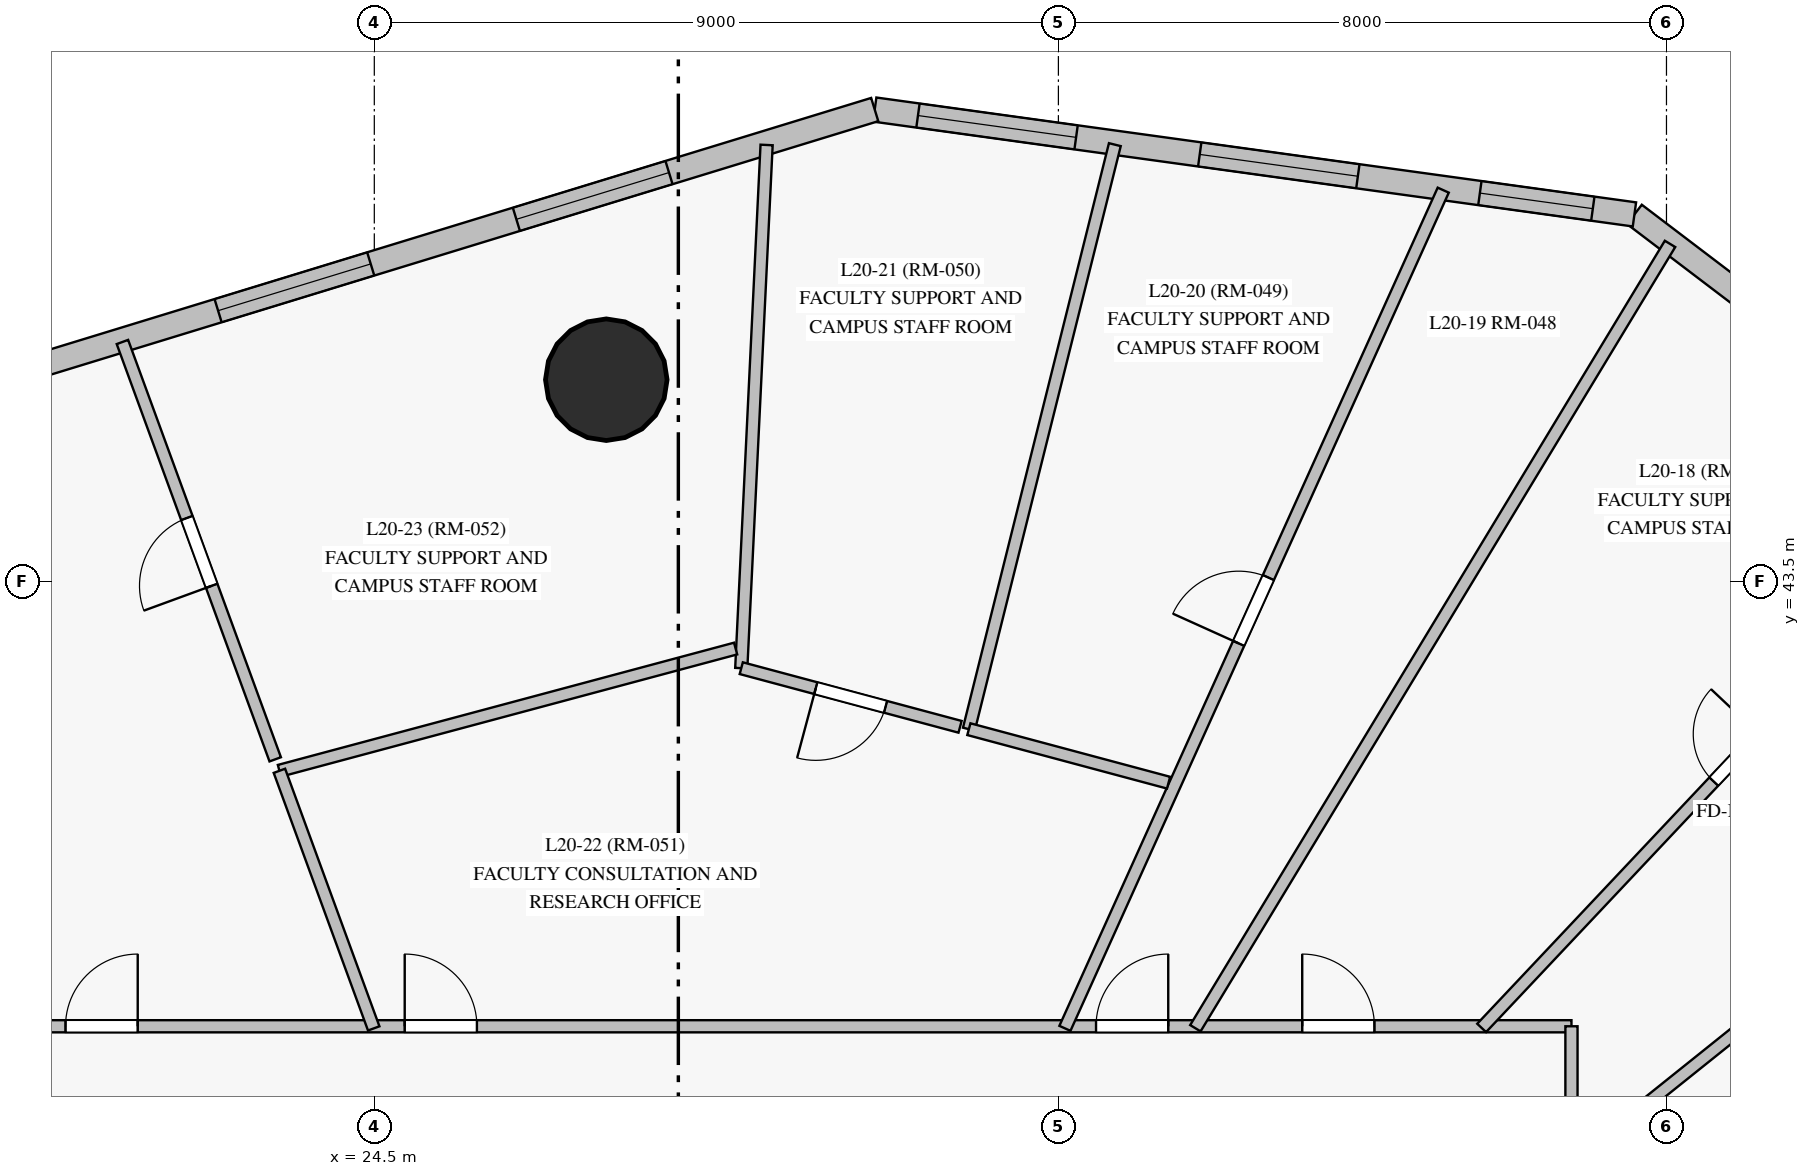
"""IFC4 building model, lengths in metres.
Left out: names, types, materials, properties, quantities, classifications, styles, units other than length and angle.
Written with IfcOpenShell. Run it as: python <this file> out.ifc"""

import sys

from ifc_helpers import new_model, si_unit, direction, frame, frame_2d, origin, origin_with_axes, origin_2d, place, context, subcontext, project, spatial, rectangle, circle, extrude, source, transform, mapped, element, fill, save


model = new_model("IFC4")
c1 = context("Model", 3, precision=1e-05, world=origin(), true_north=direction((0.0, 1.0)))
c2 = subcontext(c1, "Body", "Model", "MODEL_VIEW")
j1 = project(units=[si_unit("LENGTHUNIT", "METRE"), si_unit("PLANEANGLEUNIT", "RADIAN")], contexts=[c1])
p1 = place(None, origin())
s1 = spatial("IfcSite", under=j1, at=p1, CompositionType="ELEMENT")
p2 = place(p1, origin())
s2 = spatial("IfcBuilding", under=s1, at=p2, CompositionType="ELEMENT")
p3 = place(p2, frame((0.0, 0.0, 76.9)))
s3 = spatial("IfcBuildingStorey", under=s2, at=p3, CompositionType="ELEMENT", Elevation=76.9)
m1 = source(origin_with_axes(), c2, "Body", "SweptSolid", [
    extrude(circle(Radius=0.8, at=origin_2d()), origin(), (0.0, 0.0, 1.0), 3.6),
])
p4 = place(p3, frame((27.552, 46.156, 0.0), z_axis=(0.0, 0.0, 1.0), x_axis=(1.0, 0.0, 0.0)))
e1 = element("IfcColumn", 1, at=p4, inside=s3, PredefinedType="COLUMN", context=c2, shape_type="MappedRepresentation", body=[
    mapped(m1, transform((0.0, 0.0, 0.0), scale=1.0)),
])
p5 = place(p3, frame((51.069, 40.737, 0.0), z_axis=(0.0, 0.0, 1.0), x_axis=(-0.796119452113, 0.605139502898, 0.0)))
e2 = element("IfcWall", 2, at=p5, inside=s3, PredefinedType="SOLIDWALL", context=c2, shape_type="SweptSolid", body=[
    extrude(rectangle(XDim=12.548, YDim=0.32, at=frame_2d((6.274, 0.0))), origin(), (0.0, 0.0, 1.0), 3.35),
])
p6 = place(p5, frame((0.503, 0.0, 0.85)))
e3 = element("IfcOpeningElement", 3, at=p6, cuts=e2, PredefinedType="OPENING", context=c2, shape_type="SweptSolid", body=[
    extrude(rectangle(XDim=2.1, YDim=1.95, at=frame_2d((1.05, 0.975))), frame((0.0, 0.17, 0.0), z_axis=(0.0, -1.0, 0.0), x_axis=(1.0, 0.0, 0.0)), (0.0, 0.0, 1.0), 0.34),
])
p7 = place(p5, frame((3.796, 0.0, 0.85)))
e4 = element("IfcOpeningElement", 4, at=p7, cuts=e2, PredefinedType="OPENING", context=c2, shape_type="SweptSolid", body=[
    extrude(rectangle(XDim=2.1, YDim=1.95, at=frame_2d((1.05, 0.975))), frame((0.0, 0.17, 0.0), z_axis=(0.0, -1.0, 0.0), x_axis=(1.0, 0.0, 0.0)), (0.0, 0.0, 1.0), 0.34),
])
p8 = place(p5, frame((8.241, 0.0, 0.85)))
e5 = element("IfcOpeningElement", 5, at=p8, cuts=e2, PredefinedType="OPENING", context=c2, shape_type="SweptSolid", body=[
    extrude(rectangle(XDim=2.1, YDim=1.95, at=frame_2d((1.05, 0.975))), frame((0.0, 0.17, 0.0), z_axis=(0.0, -1.0, 0.0), x_axis=(1.0, 0.0, 0.0)), (0.0, 0.0, 1.0), 0.34),
])
p9 = place(p3, frame((41.079, 48.331, 0.0), z_axis=(0.0, 0.0, 1.0), x_axis=(-0.990610962214, 0.136711087848, 0.0)))
e6 = element("IfcWall", 6, at=p9, inside=s3, PredefinedType="SOLIDWALL", context=c2, shape_type="SweptSolid", body=[
    extrude(rectangle(XDim=10.09, YDim=0.32, at=frame_2d((5.045, 0.0))), origin(), (0.0, 0.0, 1.0), 3.35),
])
p10 = place(p9, frame((0.553, 0.0, 0.85)))
e7 = element("IfcOpeningElement", 7, at=p10, cuts=e6, PredefinedType="OPENING", context=c2, shape_type="SweptSolid", body=[
    extrude(rectangle(XDim=1.5, YDim=1.85, at=frame_2d((0.75, 0.925))), frame((0.0, 0.17, 0.0), z_axis=(0.0, -1.0, 0.0), x_axis=(1.0, 0.0, 0.0)), (0.0, 0.0, 1.0), 0.34),
])
p11 = place(p9, frame((3.673, 0.0, 0.85)))
e8 = element("IfcOpeningElement", 8, at=p11, cuts=e6, PredefinedType="OPENING", context=c2, shape_type="SweptSolid", body=[
    extrude(rectangle(XDim=2.1, YDim=1.95, at=frame_2d((1.05, 0.975))), frame((0.0, 0.17, 0.0), z_axis=(0.0, -1.0, 0.0), x_axis=(1.0, 0.0, 0.0)), (0.0, 0.0, 1.0), 0.34),
])
p12 = place(p9, frame((7.415, 0.0, 0.85)))
e9 = element("IfcOpeningElement", 9, at=p12, cuts=e6, PredefinedType="OPENING", context=c2, shape_type="SweptSolid", body=[
    extrude(rectangle(XDim=2.1, YDim=1.95, at=frame_2d((1.05, 0.975))), frame((0.0, 0.17, 0.0), z_axis=(0.0, -1.0, 0.0), x_axis=(1.0, 0.0, 0.0)), (0.0, 0.0, 1.0), 0.34),
])
p13 = place(p3, frame((31.083, 49.71, 0.0), z_axis=(0.0, 0.0, 1.0), x_axis=(-0.956152758826, -0.292868403536, 0.0)))
e10 = element("IfcWall", 10, at=p13, inside=s3, PredefinedType="SOLIDWALL", context=c2, shape_type="SweptSolid", body=[
    extrude(rectangle(XDim=14.63, YDim=0.32, at=frame_2d((7.315, 0.0))), origin(), (0.0, 0.0, 1.0), 3.35),
])
p14 = place(p13, frame((2.831, 0.0, 0.85)))
e11 = element("IfcOpeningElement", 11, at=p14, cuts=e10, PredefinedType="OPENING", context=c2, shape_type="SweptSolid", body=[
    extrude(rectangle(XDim=2.1, YDim=1.95, at=frame_2d((1.05, 0.975))), frame((0.0, 0.17, 0.0), z_axis=(0.0, -1.0, 0.0), x_axis=(1.0, 0.0, 0.0)), (0.0, 0.0, 1.0), 0.34),
])
p15 = place(p13, frame((6.935, 0.0, 0.85)))
e12 = element("IfcOpeningElement", 12, at=p15, cuts=e10, PredefinedType="OPENING", context=c2, shape_type="SweptSolid", body=[
    extrude(rectangle(XDim=2.1, YDim=1.95, at=frame_2d((1.05, 0.975))), frame((0.0, 0.17, 0.0), z_axis=(0.0, -1.0, 0.0), x_axis=(1.0, 0.0, 0.0)), (0.0, 0.0, 1.0), 0.34),
])
p16 = place(p13, frame((11.414, 0.0, 0.85)))
e13 = element("IfcOpeningElement", 13, at=p16, cuts=e10, PredefinedType="OPENING", context=c2, shape_type="SweptSolid", body=[
    extrude(rectangle(XDim=2.1, YDim=1.95, at=frame_2d((1.05, 0.975))), frame((0.0, 0.17, 0.0), z_axis=(0.0, -1.0, 0.0), x_axis=(1.0, 0.0, 0.0)), (0.0, 0.0, 1.0), 0.34),
])
p17 = place(p3, frame((10.5, 37.65, 0.0), z_axis=(0.0, 0.0, 1.0), x_axis=(1.0, 0.0, 0.0)))
e14 = element("IfcWall", 14, at=p17, inside=s3, PredefinedType="PARTITIONING", context=c2, shape_type="SweptSolid", body=[
    extrude(rectangle(XDim=29.75, YDim=0.16, at=frame_2d((14.875, 0.0))), origin(), (0.0, 0.0, 1.0), 2.75),
])
p18 = place(p17, frame((26.208, 0.0, 0.0)))
e15 = element("IfcOpeningElement", 15, at=p18, cuts=e14, PredefinedType="OPENING", context=c2, shape_type="SweptSolid", body=[
    extrude(rectangle(XDim=0.95, YDim=2.15, at=frame_2d((0.475, 1.075))), frame((0.0, 0.09, 0.0), z_axis=(0.0, -1.0, 0.0), x_axis=(1.0, 0.0, 0.0)), (0.0, 0.0, 1.0), 0.18),
])
p19 = place(p17, frame((23.495, 0.0, 0.0)))
e16 = element("IfcOpeningElement", 16, at=p19, cuts=e14, PredefinedType="OPENING", context=c2, shape_type="SweptSolid", body=[
    extrude(rectangle(XDim=0.95, YDim=2.15, at=frame_2d((0.475, 1.075))), frame((0.0, 0.09, 0.0), z_axis=(0.0, -1.0, 0.0), x_axis=(1.0, 0.0, 0.0)), (0.0, 0.0, 1.0), 0.18),
])
p20 = place(p17, frame((14.4, 0.0, 0.0)))
e17 = element("IfcOpeningElement", 17, at=p20, cuts=e14, PredefinedType="OPENING", context=c2, shape_type="SweptSolid", body=[
    extrude(rectangle(XDim=0.95, YDim=2.15, at=frame_2d((0.475, 1.075))), frame((0.0, 0.09, 0.0), z_axis=(0.0, -1.0, 0.0), x_axis=(1.0, 0.0, 0.0)), (0.0, 0.0, 1.0), 0.18),
])
p21 = place(p17, frame((9.938, 0.0, 0.0)))
e18 = element("IfcOpeningElement", 18, at=p21, cuts=e14, PredefinedType="OPENING", context=c2, shape_type="SweptSolid", body=[
    extrude(rectangle(XDim=0.95, YDim=2.15, at=frame_2d((0.475, 1.075))), frame((0.0, 0.09, 0.0), z_axis=(0.0, -1.0, 0.0), x_axis=(1.0, 0.0, 0.0)), (0.0, 0.0, 1.0), 0.18),
])
p22 = place(p17, frame((6.962, 0.0, 0.0)))
e19 = element("IfcOpeningElement", 19, at=p22, cuts=e14, PredefinedType="OPENING", context=c2, shape_type="SweptSolid", body=[
    extrude(rectangle(XDim=0.95, YDim=2.15, at=frame_2d((0.475, 1.075))), frame((0.0, 0.09, 0.0), z_axis=(0.0, -1.0, 0.0), x_axis=(1.0, 0.0, 0.0)), (0.0, 0.0, 1.0), 0.18),
])
p23 = place(p3, frame((40.25, 37.65, 0.0), z_axis=(0.0, 0.0, 1.0), x_axis=(0.0, -1.0, 0.0)))
e20 = element("IfcWall", 20, at=p23, inside=s3, PredefinedType="PARTITIONING", context=c2, shape_type="SweptSolid", body=[
    extrude(rectangle(XDim=22.3, YDim=0.16, at=frame_2d((11.15, 0.0))), origin(), (0.0, 0.0, 1.0), 2.75),
])
p24 = place(p23, frame((14.02, 0.0, 0.0)))
e21 = element("IfcOpeningElement", 21, at=p24, cuts=e20, PredefinedType="OPENING", context=c2, shape_type="SweptSolid", body=[
    extrude(rectangle(XDim=0.95, YDim=2.15, at=frame_2d((0.475, 1.075))), frame((0.0, 0.09, 0.0), z_axis=(0.0, -1.0, 0.0), x_axis=(1.0, 0.0, 0.0)), (0.0, 0.0, 1.0), 0.18),
])
p25 = place(p23, frame((10.675, 0.0, 0.0)))
e22 = element("IfcOpeningElement", 22, at=p25, cuts=e20, PredefinedType="OPENING", context=c2, shape_type="SweptSolid", body=[
    extrude(rectangle(XDim=0.95, YDim=2.15, at=frame_2d((0.475, 1.075))), frame((0.0, 0.09, 0.0), z_axis=(0.0, -1.0, 0.0), x_axis=(1.0, 0.0, 0.0)), (0.0, 0.0, 1.0), 0.18),
])
p26 = place(p23, frame((8.167, 0.0, 0.0)))
e23 = element("IfcOpeningElement", 23, at=p26, cuts=e20, PredefinedType="OPENING", context=c2, shape_type="SweptSolid", body=[
    extrude(rectangle(XDim=0.86, YDim=2.1, at=frame_2d((0.43, 1.05))), frame((0.0, 0.09, 0.0), z_axis=(0.0, -1.0, 0.0), x_axis=(1.0, 0.0, 0.0)), (0.0, 0.0, 1.0), 0.18),
])
p27 = place(p23, frame((5.49, 0.0, 0.0)))
e24 = element("IfcOpeningElement", 24, at=p27, cuts=e20, PredefinedType="OPENING", context=c2, shape_type="SweptSolid", body=[
    extrude(rectangle(XDim=0.95, YDim=2.15, at=frame_2d((0.475, 1.075))), frame((0.0, 0.09, 0.0), z_axis=(0.0, -1.0, 0.0), x_axis=(1.0, 0.0, 0.0)), (0.0, 0.0, 1.0), 0.18),
])
p28 = place(p23, frame((2.932, 0.0, 0.0)))
e25 = element("IfcOpeningElement", 25, at=p28, cuts=e20, PredefinedType="OPENING", context=c2, shape_type="SweptSolid", body=[
    extrude(rectangle(XDim=0.95, YDim=2.15, at=frame_2d((0.475, 1.075))), frame((0.0, 0.09, 0.0), z_axis=(0.0, -1.0, 0.0), x_axis=(1.0, 0.0, 0.0)), (0.0, 0.0, 1.0), 0.18),
])
p29 = place(p23, frame((6.622, 0.0, 0.0)))
e26 = element("IfcOpeningElement", 26, at=p29, cuts=e20, PredefinedType="OPENING", context=c2, shape_type="SweptSolid", body=[
    extrude(rectangle(XDim=0.95, YDim=2.15, at=frame_2d((0.475, 1.075))), frame((0.0, 0.09, 0.0), z_axis=(0.0, -1.0, 0.0), x_axis=(1.0, 0.0, 0.0)), (0.0, 0.0, 1.0), 0.18),
])
p30 = place(p3, frame((40.223, 32.396, 0.0), z_axis=(0.0, 0.0, 1.0), x_axis=(0.891304627561, 0.453404963459, 0.0)))
e27 = element("IfcWall", 27, at=p30, inside=s3, PredefinedType="PARTITIONING", context=c2, shape_type="SweptSolid", body=[
    extrude(rectangle(XDim=12.691, YDim=0.16, at=frame_2d((6.345, 0.0))), origin(), (0.0, 0.0, 1.0), 3.35),
])
p31 = place(p3, frame((33.586, 37.623, 0.0), z_axis=(0.0, 0.0, 1.0), x_axis=(0.411385577094, 0.911461412765, 0.0)))
e28 = element("IfcWall", 28, at=p31, inside=s3, PredefinedType="PARTITIONING", context=c2, shape_type="SweptSolid", body=[
    extrude(rectangle(XDim=12.098, YDim=0.16, at=frame_2d((6.049, 0.0))), origin(), (0.0, 0.0, 1.0), 3.35),
])
p32 = place(p31, frame((5.557, 0.0, 0.0)))
e29 = element("IfcOpeningElement", 29, at=p32, cuts=e28, PredefinedType="OPENING", context=c2, shape_type="SweptSolid", body=[
    extrude(rectangle(XDim=0.95, YDim=2.15, at=frame_2d((0.475, 1.075))), frame((0.0, 0.09, 0.0), z_axis=(0.0, -1.0, 0.0), x_axis=(1.0, 0.0, 0.0)), (0.0, 0.0, 1.0), 0.18),
])
p33 = place(p3, frame((35.302, 37.624, 0.0), z_axis=(0.0, 0.0, 1.0), x_axis=(0.517751606505, 0.855530989481, 0.0)))
e30 = element("IfcWall", 30, at=p33, inside=s3, PredefinedType="PARTITIONING", context=c2, shape_type="SweptSolid", body=[
    extrude(rectangle(XDim=12.061, YDim=0.16, at=frame_2d((6.031, 0.0))), origin(), (0.0, 0.0, 1.0), 3.35),
])
p34 = place(p3, frame((39.068, 37.628, 0.0), z_axis=(0.0, 0.0, 1.0), x_axis=(0.685796563099, 0.727793290737, 0.0)))
e31 = element("IfcWall", 31, at=p34, inside=s3, PredefinedType="PARTITIONING", context=c2, shape_type="SweptSolid", body=[
    extrude(rectangle(XDim=9.766, YDim=0.16, at=frame_2d((4.883, 0.0))), origin(), (0.0, 0.0, 1.0), 3.35),
])
p35 = place(p34, frame((4.453, 0.0, 0.0)))
e32 = element("IfcOpeningElement", 32, at=p35, cuts=e31, PredefinedType="OPENING", context=c2, shape_type="SweptSolid", body=[
    extrude(rectangle(XDim=0.86, YDim=2.04, at=frame_2d((0.43, 1.02))), frame((0.0, 0.09, 0.0), z_axis=(0.0, -1.0, 0.0), x_axis=(1.0, 0.0, 0.0)), (0.0, 0.0, 1.0), 0.18),
])
p36 = place(p3, frame((32.322, 41.559, 0.0), z_axis=(0.0, 0.0, 1.0), x_axis=(0.242289200533, 0.97020407302, 0.0)))
e33 = element("IfcWall", 33, at=p36, inside=s3, PredefinedType="PARTITIONING", context=c2, shape_type="SweptSolid", body=[
    extrude(rectangle(XDim=7.926, YDim=0.16, at=frame_2d((3.963, 0.0))), origin(), (0.0, 0.0, 1.0), 3.35),
])
p37 = place(p3, frame((40.227, 35.818, 0.0), z_axis=(0.0, 0.0, 1.0), x_axis=(0.780414563341, 0.625262432363, 0.0)))
e34 = element("IfcWall", 34, at=p37, inside=s3, PredefinedType="PARTITIONING", context=c2, shape_type="SweptSolid", body=[
    extrude(rectangle(XDim=7.449, YDim=0.16, at=frame_2d((3.725, 0.0))), origin(), (0.0, 0.0, 1.0), 2.7),
])
p38 = place(p3, frame((29.328, 42.361, 0.0), z_axis=(0.0, 0.0, 1.0), x_axis=(0.048357914728, 0.998830071675, 0.0)))
e35 = element("IfcWall", 35, at=p38, inside=s3, PredefinedType="PARTITIONING", context=c2, shape_type="SweptSolid", body=[
    extrude(rectangle(XDim=6.891, YDim=0.16, at=frame_2d((3.446, 0.0))), origin(), (0.0, 0.0, 1.0), 3.35),
])
p39 = place(p3, frame((23.196, 41.162, 0.0), z_axis=(0.0, 0.0, 1.0), x_axis=(-0.343750376803, 0.939061062151, 0.0)))
e36 = element("IfcWall", 36, at=p39, inside=s3, PredefinedType="PARTITIONING", context=c2, shape_type="SweptSolid", body=[
    extrude(rectangle(XDim=5.847, YDim=0.16, at=frame_2d((2.924, 0.0))), origin(), (0.0, 0.0, 1.0), 3.35),
])
p40 = place(p39, frame((2.431, 0.0, 0.0)))
e37 = element("IfcOpeningElement", 37, at=p40, cuts=e36, PredefinedType="OPENING", context=c2, shape_type="SweptSolid", body=[
    extrude(rectangle(XDim=0.95, YDim=2.15, at=frame_2d((0.475, 1.075))), frame((0.0, 0.09, 0.0), z_axis=(0.0, -1.0, 0.0), x_axis=(1.0, 0.0, 0.0)), (0.0, 0.0, 1.0), 0.18),
])
p41 = place(p3, frame((23.252, 41.011, 0.0), z_axis=(0.0, 0.0, 1.0), x_axis=(0.965925777149, 0.258819228495, 0.0)))
e38 = element("IfcWall", 38, at=p41, inside=s3, PredefinedType="PARTITIONING", context=c2, shape_type="SweptSolid", body=[
    extrude(rectangle(XDim=6.213, YDim=0.16, at=frame_2d((3.107, 0.0))), origin(), (0.0, 0.0, 1.0), 3.35),
])
p42 = place(p3, frame((24.492, 37.622, 0.0), z_axis=(0.0, 0.0, 1.0), x_axis=(-0.343713946851, 0.939074396808, 0.0)))
e39 = element("IfcWall", 39, at=p42, inside=s3, PredefinedType="PARTITIONING", context=c2, shape_type="SweptSolid", body=[
    extrude(rectangle(XDim=3.609, YDim=0.16, at=frame_2d((1.805, 0.0))), origin(), (0.0, 0.0, 1.0), 3.35),
])
p43 = place(p3, frame((32.206, 41.59, 0.0), z_axis=(0.0, 0.0, 1.0), x_axis=(-0.965907820273, 0.25888623512, 0.0)))
e40 = element("IfcWall", 40, at=p43, inside=s3, PredefinedType="PARTITIONING", context=c2, shape_type="SweptSolid", body=[
    extrude(rectangle(XDim=2.98, YDim=0.16, at=frame_2d((1.49, 0.0))), origin(), (0.0, 0.0, 1.0), 3.35),
])
p44 = place(p43, frame((1.015, 0.0, 0.0)))
e41 = element("IfcOpeningElement", 41, at=p44, cuts=e40, PredefinedType="OPENING", context=c2, shape_type="SweptSolid", body=[
    extrude(rectangle(XDim=0.95, YDim=2.15, at=frame_2d((0.475, 1.075))), frame((0.0, 0.09, 0.0), z_axis=(0.0, -1.0, 0.0), x_axis=(1.0, 0.0, 0.0)), (0.0, 0.0, 1.0), 0.18),
])
p45 = place(p3, frame((34.949, 40.855, 0.0), z_axis=(0.0, 0.0, 1.0), x_axis=(-0.965928818058, 0.258807879411, 0.0)))
e42 = element("IfcWall", 42, at=p45, inside=s3, PredefinedType="PARTITIONING", context=c2, shape_type="SweptSolid", body=[
    extrude(rectangle(XDim=2.72, YDim=0.16, at=frame_2d((1.36, 0.0))), origin(), (0.0, 0.0, 1.0), 3.35),
])
m2 = source(origin_with_axes(), c2, "Body", "SweptSolid", [
    extrude(rectangle(XDim=1.5, YDim=1.85, at=frame_2d((0.75, 0.925))), frame((0.0, 0.03, 0.0), z_axis=(0.0, -1.0, 0.0), x_axis=(1.0, 0.0, 0.0)), (0.0, 0.0, 1.0), 0.06),
])
p46 = place(p10, origin())
e43 = element("IfcWindow", 43, at=p46, inside=s3, PartitioningType="SINGLE_PANEL", PredefinedType="WINDOW", context=c2, shape_type="MappedRepresentation", body=[
    mapped(m2, transform((0.0, 0.0, 0.0), scale=1.0)),
])
fill(e7, e43)
m3 = source(origin_with_axes(), c2, "Body", "SweptSolid", [
    extrude(rectangle(XDim=2.1, YDim=1.95, at=frame_2d((1.05, 0.975))), frame((0.0, 0.03, 0.0), z_axis=(0.0, -1.0, 0.0), x_axis=(1.0, 0.0, 0.0)), (0.0, 0.0, 1.0), 0.06),
])
p47 = place(p11, origin())
e44 = element("IfcWindow", 44, at=p47, inside=s3, PartitioningType="SINGLE_PANEL", PredefinedType="WINDOW", context=c2, shape_type="MappedRepresentation", body=[
    mapped(m3, transform((0.0, 0.0, 0.0), scale=1.0)),
])
fill(e8, e44)
p48 = place(p12, origin())
e45 = element("IfcWindow", 45, at=p48, inside=s3, PartitioningType="SINGLE_PANEL", PredefinedType="WINDOW", context=c2, shape_type="MappedRepresentation", body=[
    mapped(m3, transform((0.0, 0.0, 0.0), scale=1.0)),
])
fill(e9, e45)
p49 = place(p14, origin())
e46 = element("IfcWindow", 46, at=p49, inside=s3, PartitioningType="SINGLE_PANEL", PredefinedType="WINDOW", context=c2, shape_type="MappedRepresentation", body=[
    mapped(m3, transform((0.0, 0.0, 0.0), scale=1.0)),
])
fill(e11, e46)
p50 = place(p15, origin())
e47 = element("IfcWindow", 47, at=p50, inside=s3, PartitioningType="SINGLE_PANEL", PredefinedType="WINDOW", context=c2, shape_type="MappedRepresentation", body=[
    mapped(m3, transform((0.0, 0.0, 0.0), scale=1.0)),
])
fill(e12, e47)
m4 = source(origin_with_axes(), c2, "Body", "SweptSolid", [
    extrude(rectangle(XDim=0.95, YDim=2.15, at=frame_2d((0.475, 1.075))), frame((0.0, 0.025, 0.0), z_axis=(0.0, -1.0, 0.0), x_axis=(1.0, 0.0, 0.0)), (0.0, 0.0, 1.0), 0.05),
])
p51 = place(p18, origin())
e48 = element("IfcDoor", 48, at=p51, inside=s3, OperationType="SINGLE_SWING_LEFT", PredefinedType="DOOR", context=c2, shape_type="MappedRepresentation", body=[
    mapped(m4, transform((0.0, 0.0, 0.0), scale=1.0)),
])
fill(e15, e48)
p52 = place(p19, origin())
e49 = element("IfcDoor", 49, at=p52, inside=s3, OperationType="SINGLE_SWING_RIGHT", PredefinedType="DOOR", context=c2, shape_type="MappedRepresentation", body=[
    mapped(m4, transform((0.0, 0.0, 0.0), scale=1.0)),
])
fill(e16, e49)
p53 = place(p20, origin())
e50 = element("IfcDoor", 50, at=p53, inside=s3, OperationType="SINGLE_SWING_LEFT", PredefinedType="DOOR", context=c2, shape_type="MappedRepresentation", body=[
    mapped(m4, transform((0.0, 0.0, 0.0), scale=1.0)),
])
fill(e17, e50)
p54 = place(p21, origin())
e51 = element("IfcDoor", 51, at=p54, inside=s3, OperationType="SINGLE_SWING_RIGHT", PredefinedType="DOOR", context=c2, shape_type="MappedRepresentation", body=[
    mapped(m4, transform((0.0, 0.0, 0.0), scale=1.0)),
])
fill(e18, e51)
p55 = place(p32, origin())
e52 = element("IfcDoor", 52, at=p55, inside=s3, OperationType="SINGLE_SWING_LEFT", PredefinedType="DOOR", context=c2, shape_type="MappedRepresentation", body=[
    mapped(m4, transform((0.0, 0.0, 0.0), scale=1.0)),
])
fill(e29, e52)
p56 = place(p44, origin())
e53 = element("IfcDoor", 53, at=p56, inside=s3, OperationType="SINGLE_SWING_RIGHT", PredefinedType="DOOR", context=c2, shape_type="MappedRepresentation", body=[
    mapped(m4, transform((0.0, 0.0, 0.0), scale=1.0)),
])
fill(e41, e53)
p57 = place(p40, origin())
e54 = element("IfcDoor", 54, at=p57, inside=s3, OperationType="SINGLE_SWING_LEFT", PredefinedType="DOOR", context=c2, shape_type="MappedRepresentation", body=[
    mapped(m4, transform((0.0, 0.0, 0.0), scale=1.0)),
])
fill(e37, e54)
m5 = source(origin_with_axes(), c2, "Body", "SweptSolid", [
    extrude(rectangle(XDim=0.86, YDim=2.04, at=frame_2d((0.43, 1.02))), frame((0.0, 0.025, 0.0), z_axis=(0.0, -1.0, 0.0), x_axis=(1.0, 0.0, 0.0)), (0.0, 0.0, 1.0), 0.05),
])
p58 = place(p35, origin())
e55 = element("IfcDoor", 55, at=p58, inside=s3, OperationType="SINGLE_SWING_RIGHT", PredefinedType="DOOR", context=c2, shape_type="MappedRepresentation", body=[
    mapped(m5, transform((0.0, 0.0, 0.0), scale=1.0)),
])
fill(e32, e55)
save(model, sys.argv[1])
